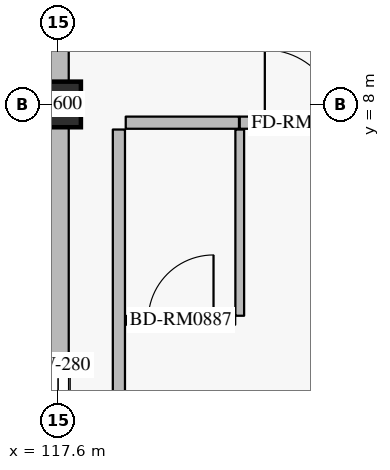
"""IFC4 building model, lengths in metres.
Left out: names, types, materials, properties, quantities, classifications, styles, units other than length and angle.
Written with IfcOpenShell. Run it as: python <this file> out.ifc"""

import sys

from ifc_helpers import new_model, si_unit, direction, frame, frame_2d, origin, origin_2d, place, context, subcontext, project, spatial, rectangle, extrude, element, fill, save


model = new_model("IFC4")
c1 = context("Model", 3, precision=1e-05, world=origin(), true_north=direction((0.0, 1.0)))
c2 = subcontext(c1, "Body", "Model", "MODEL_VIEW")
j1 = project(units=[si_unit("LENGTHUNIT", "METRE"), si_unit("PLANEANGLEUNIT", "RADIAN")], contexts=[c1])
p1 = place(None, origin())
s1 = spatial("IfcSite", under=j1, at=p1, CompositionType="ELEMENT")
p2 = place(p1, origin())
s2 = spatial("IfcBuilding", under=s1, at=p2, CompositionType="ELEMENT")
p3 = place(p2, frame((0.0, 0.0, 32.4)))
s3 = spatial("IfcBuildingStorey", under=s2, at=p3, CompositionType="ELEMENT", Elevation=32.4)
p4 = place(p3, frame((117.6, 8.0, 0.0), z_axis=(0.0, 0.0, 1.0), x_axis=(1.0, 0.0, 0.0)))
e1 = element("IfcColumn", 1, at=p4, inside=s3, PredefinedType="COLUMN", context=c2, shape_type="SweptSolid", body=[
    extrude(rectangle(XDim=0.6, YDim=0.6, at=origin_2d()), origin(), (0.0, 0.0, 1.0), 3.6),
])
p5 = place(p3, frame((117.6, 0.35, 0.0), z_axis=(0.0, 0.0, 1.0), x_axis=(0.0, 1.0, 0.0)))
e2 = element("IfcWall", 2, at=p5, inside=s3, PredefinedType="SOLIDWALL", context=c2, shape_type="SweptSolid", body=[
    extrude(rectangle(XDim=7.35, YDim=0.28, at=frame_2d((3.675, 0.0))), origin(), (0.0, 0.0, 1.0), 2.7),
])
p6 = place(p5, frame((3.025, 0.0, 0.5)))
e3 = element("IfcOpeningElement", 3, at=p6, cuts=e2, PredefinedType="OPENING", context=c2, shape_type="SweptSolid", body=[
    extrude(rectangle(XDim=1.3, YDim=1.65, at=frame_2d((0.65, 0.825))), frame((0.0, 0.15, 0.0), z_axis=(0.0, -1.0, 0.0), x_axis=(1.0, 0.0, 0.0)), (0.0, 0.0, 1.0), 0.3),
])
p7 = place(p3, frame((117.6, 8.3, 0.0), z_axis=(0.0, 0.0, 1.0), x_axis=(0.0, 1.0, 0.0)))
e4 = element("IfcWall", 4, at=p7, inside=s3, PredefinedType="SOLIDWALL", context=c2, shape_type="SweptSolid", body=[
    extrude(rectangle(XDim=7.35, YDim=0.28, at=frame_2d((3.675, 0.0))), origin(), (0.0, 0.0, 1.0), 2.7),
])
p8 = place(p7, frame((3.025, 0.0, 0.5)))
e5 = element("IfcOpeningElement", 5, at=p8, cuts=e4, PredefinedType="OPENING", context=c2, shape_type="SweptSolid", body=[
    extrude(rectangle(XDim=1.3, YDim=1.65, at=frame_2d((0.65, 0.825))), frame((0.0, 0.15, 0.0), z_axis=(0.0, -1.0, 0.0), x_axis=(1.0, 0.0, 0.0)), (0.0, 0.0, 1.0), 0.3),
])
p9 = place(p3, frame((118.49, 7.76, 0.0), z_axis=(0.0, 0.0, 1.0), x_axis=(1.0, 0.0, 0.0)))
e6 = element("IfcWall", 6, at=p9, inside=s3, PredefinedType="PARTITIONING", context=c2, shape_type="SweptSolid", body=[
    extrude(rectangle(XDim=1.49, YDim=0.16, at=frame_2d((0.745, 0.0))), origin(), (0.0, 0.0, 1.0), 3.335),
])
p10 = place(p3, frame((119.99, 7.76, 0.0), z_axis=(0.0, 0.0, 1.0), x_axis=(1.0, 0.0, 0.0)))
e7 = element("IfcWall", 7, at=p10, inside=s3, PredefinedType="PARTITIONING", context=c2, shape_type="SweptSolid", body=[
    extrude(rectangle(XDim=1.62, YDim=0.16, at=frame_2d((0.81, 0.0))), origin(), (0.0, 0.0, 1.0), 3.335),
])
p11 = place(p10, frame((0.33, 0.0, 0.0)))
e8 = element("IfcOpeningElement", 8, at=p11, cuts=e7, PredefinedType="OPENING", context=c2, shape_type="SweptSolid", body=[
    extrude(rectangle(XDim=0.96, YDim=2.2, at=frame_2d((0.48, 1.1))), frame((0.0, 0.09, 0.0), z_axis=(0.0, -1.0, 0.0), x_axis=(1.0, 0.0, 0.0)), (0.0, 0.0, 1.0), 0.18),
])
p12 = place(p3, frame((119.99, 5.22, 0.0), z_axis=(0.0, 0.0, 1.0), x_axis=(0.0, 1.0, 0.0)))
e9 = element("IfcWall", 9, at=p12, inside=s3, PredefinedType="PARTITIONING", context=c2, shape_type="SweptSolid", body=[
    extrude(rectangle(XDim=2.45, YDim=0.115, at=frame_2d((1.225, 0.0))), origin(), (0.0, 0.0, 1.0), 3.335),
])
p13 = place(p3, frame((118.5, 5.16, 0.0), z_axis=(0.0, 0.0, 1.0), x_axis=(1.0, 0.0, 0.0)))
e10 = element("IfcWall", 10, at=p13, inside=s3, PredefinedType="PARTITIONING", context=c2, shape_type="SweptSolid", body=[
    extrude(rectangle(XDim=1.43, YDim=0.115, at=frame_2d((0.715, 0.0))), origin(), (0.0, 0.0, 1.0), 3.335),
])
p14 = place(p13, frame((0.285, 0.0, 0.0)))
e11 = element("IfcOpeningElement", 11, at=p14, cuts=e10, PredefinedType="OPENING", context=c2, shape_type="SweptSolid", body=[
    extrude(rectangle(XDim=0.86, YDim=2.12, at=frame_2d((0.43, 1.06))), frame((0.0, 0.067, 0.0), z_axis=(0.0, -1.0, 0.0), x_axis=(1.0, 0.0, 0.0)), (0.0, 0.0, 1.0), 0.135),
])
p15 = place(p3, frame((118.4, 0.34, 0.0), z_axis=(0.0, 0.0, 1.0), x_axis=(0.0, 1.0, 0.0)))
e12 = element("IfcWall", 12, at=p15, inside=s3, PredefinedType="PARTITIONING", context=c2, shape_type="SweptSolid", body=[
    extrude(rectangle(XDim=7.33, YDim=0.16, at=frame_2d((3.665, 0.0))), origin(), (0.0, 0.0, 1.0), 3.335),
])
p16 = place(p6, origin())
e13 = element("IfcWindow", 13, at=p16, inside=s3, PartitioningType="SINGLE_PANEL", PredefinedType="WINDOW", context=c2, shape_type="SweptSolid", body=[
    extrude(rectangle(XDim=1.3, YDim=1.65, at=frame_2d((0.65, 0.825))), frame((0.0, 0.03, 0.0), z_axis=(0.0, -1.0, 0.0), x_axis=(1.0, 0.0, 0.0)), (0.0, 0.0, 1.0), 0.06),
])
fill(e3, e13)
p17 = place(p11, origin())
e14 = element("IfcDoor", 14, at=p17, inside=s3, OperationType="SINGLE_SWING_LEFT", PredefinedType="DOOR", context=c2, shape_type="SweptSolid", body=[
    extrude(rectangle(XDim=0.96, YDim=2.2, at=frame_2d((0.48, 1.1))), frame((0.0, 0.025, 0.0), z_axis=(0.0, -1.0, 0.0), x_axis=(1.0, 0.0, 0.0)), (0.0, 0.0, 1.0), 0.05),
])
fill(e8, e14)
p18 = place(p14, origin())
e15 = element("IfcDoor", 15, at=p18, inside=s3, OperationType="SINGLE_SWING_RIGHT", PredefinedType="DOOR", context=c2, shape_type="SweptSolid", body=[
    extrude(rectangle(XDim=0.86, YDim=2.12, at=frame_2d((0.43, 1.06))), frame((0.0, 0.025, 0.0), z_axis=(0.0, -1.0, 0.0), x_axis=(1.0, 0.0, 0.0)), (0.0, 0.0, 1.0), 0.05),
])
fill(e11, e15)
save(model, sys.argv[1])
